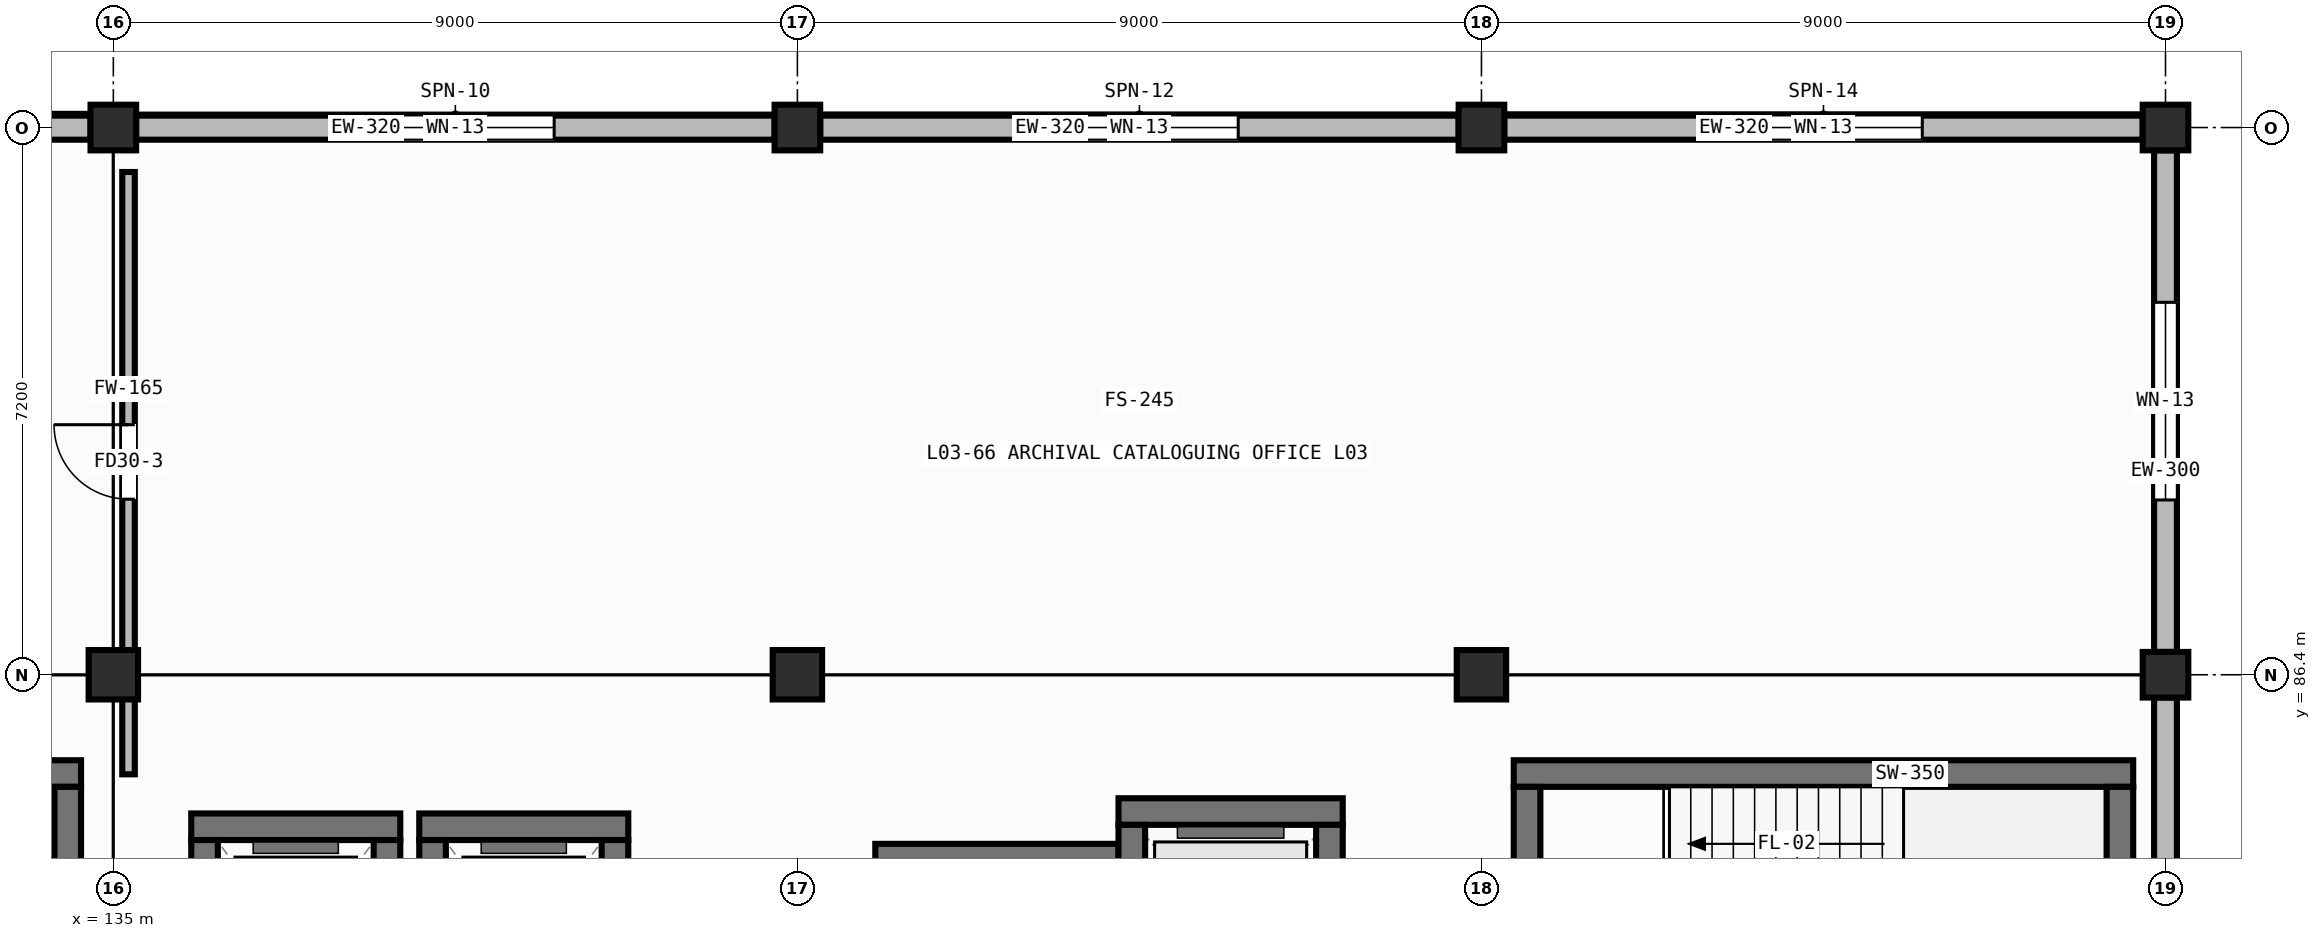
"""IFC4 building model, lengths in metres.
Left out: names, types, materials, properties, quantities, classifications, styles, units other than length and angle.
Written with IfcOpenShell. Run it as: python <this file> out.ifc"""

import sys

from ifc_helpers import new_model, si_unit, direction, frame, frame_2d, origin, origin_2d, place, context, subcontext, project, spatial, rectangle, hollow_rectangle, extrude, element, fill, save


model = new_model("IFC4")
c1 = context("Model", 3, precision=1e-05, world=origin(), true_north=direction((0.0, 1.0)))
c2 = subcontext(c1, "Body", "Model", "MODEL_VIEW")
j1 = project(units=[si_unit("LENGTHUNIT", "METRE"), si_unit("PLANEANGLEUNIT", "RADIAN")], contexts=[c1])
p1 = place(None, origin())
s1 = spatial("IfcSite", under=j1, at=p1, CompositionType="ELEMENT")
p2 = place(p1, origin())
s2 = spatial("IfcBuilding", under=s1, at=p2, CompositionType="ELEMENT")
p3 = place(p2, frame((0.0, 0.0, 8.8)))
s3 = spatial("IfcBuildingStorey", under=s2, at=p3, CompositionType="ELEMENT", Elevation=8.8)
p4 = place(p3, frame((135.0, 86.4, 0.0), z_axis=(0.0, 0.0, 1.0), x_axis=(1.0, 0.0, 0.0)))
e1 = element("IfcColumn", 1, at=p4, inside=s3, PredefinedType="COLUMN", context=c2, shape_type="SweptSolid", body=[
    extrude(hollow_rectangle(XDim=0.65, YDim=0.65, WallThickness=0.025, at=origin_2d()), origin(), (0.0, 0.0, 1.0), 4.0),
])
p5 = place(p3, frame((135.0, 93.6, 0.0), z_axis=(0.0, 0.0, 1.0), x_axis=(1.0, 0.0, 0.0)))
e2 = element("IfcColumn", 2, at=p5, inside=s3, PredefinedType="COLUMN", context=c2, shape_type="SweptSolid", body=[
    extrude(hollow_rectangle(XDim=0.6, YDim=0.6, WallThickness=0.025, at=origin_2d()), origin(), (0.0, 0.0, 1.0), 4.0),
])
p6 = place(p3, frame((144.0, 86.4, 0.0), z_axis=(0.0, 0.0, 1.0), x_axis=(1.0, 0.0, 0.0)))
e3 = element("IfcColumn", 3, at=p6, inside=s3, PredefinedType="COLUMN", context=c2, shape_type="SweptSolid", body=[
    extrude(hollow_rectangle(XDim=0.65, YDim=0.65, WallThickness=0.025, at=origin_2d()), origin(), (0.0, 0.0, 1.0), 4.0),
])
p7 = place(p3, frame((144.0, 93.6, 0.0), z_axis=(0.0, 0.0, 1.0), x_axis=(1.0, 0.0, 0.0)))
e4 = element("IfcColumn", 4, at=p7, inside=s3, PredefinedType="COLUMN", context=c2, shape_type="SweptSolid", body=[
    extrude(hollow_rectangle(XDim=0.6, YDim=0.6, WallThickness=0.025, at=origin_2d()), origin(), (0.0, 0.0, 1.0), 4.0),
])
p8 = place(p3, frame((153.0, 86.4, 0.0), z_axis=(0.0, 0.0, 1.0), x_axis=(1.0, 0.0, 0.0)))
e5 = element("IfcColumn", 5, at=p8, inside=s3, PredefinedType="COLUMN", context=c2, shape_type="SweptSolid", body=[
    extrude(hollow_rectangle(XDim=0.65, YDim=0.65, WallThickness=0.025, at=origin_2d()), origin(), (0.0, 0.0, 1.0), 4.0),
])
for number, where, z_axis, x_axis in (
    (6, (153.0, 93.6, 0.0), (0.0, 0.0, 1.0), (1.0, 0.0, 0.0)),
    (7, (162.0, 86.4, 0.0), (0.0, 0.0, 1.0), (1.0, 0.0, 0.0)),
    (8, (162.0, 93.6, 0.0), (0.0, 0.0, 1.0), (1.0, 0.0, 0.0)),
):
    element("IfcColumn", number, at=place(p3, frame(where, z_axis=z_axis, x_axis=x_axis)), inside=s3, PredefinedType="COLUMN", context=c2, shape_type="SweptSolid", body=[
        extrude(hollow_rectangle(XDim=0.6, YDim=0.6, WallThickness=0.025, at=origin_2d()), origin(), (0.0, 0.0, 1.0), 4.0),
    ])
p9 = place(p3, frame((134.7, 93.6, 0.0), z_axis=(0.0, 0.0, 1.0), x_axis=(-1.0, 0.0, 0.0)))
e9 = element("IfcWall", 9, at=p9, inside=s3, PredefinedType="STANDARD", context=c2, shape_type="SweptSolid", body=[
    extrude(rectangle(XDim=8.4, YDim=0.32, at=frame_2d((4.2, 0.0))), origin(), (0.0, 0.0, 1.0), 3.295),
])
p10 = place(p3, frame((143.7, 93.6, 0.0), z_axis=(0.0, 0.0, 1.0), x_axis=(-1.0, 0.0, 0.0)))
e10 = element("IfcWall", 10, at=p10, inside=s3, PredefinedType="STANDARD", context=c2, shape_type="SweptSolid", body=[
    extrude(rectangle(XDim=8.4, YDim=0.32, at=frame_2d((4.2, 0.0))), origin(), (0.0, 0.0, 1.0), 3.295),
])
p11 = place(p10, frame((2.9, 0.0, 0.85)))
e11 = element("IfcOpeningElement", 11, at=p11, cuts=e10, PredefinedType="OPENING", context=c2, shape_type="SweptSolid", body=[
    extrude(rectangle(XDim=2.6, YDim=1.6, at=frame_2d((1.3, 0.8))), frame((0.0, 0.172, 0.0), z_axis=(0.0, -1.0, 0.0), x_axis=(1.0, 0.0, 0.0)), (0.0, 0.0, 1.0), 0.344),
])
p12 = place(p3, frame((152.7, 93.6, 0.0), z_axis=(0.0, 0.0, 1.0), x_axis=(-1.0, 0.0, 0.0)))
e12 = element("IfcWall", 12, at=p12, inside=s3, PredefinedType="STANDARD", context=c2, shape_type="SweptSolid", body=[
    extrude(rectangle(XDim=8.4, YDim=0.32, at=frame_2d((4.2, 0.0))), origin(), (0.0, 0.0, 1.0), 3.295),
])
p13 = place(p12, frame((2.9, 0.0, 0.85)))
e13 = element("IfcOpeningElement", 13, at=p13, cuts=e12, PredefinedType="OPENING", context=c2, shape_type="SweptSolid", body=[
    extrude(rectangle(XDim=2.6, YDim=1.6, at=frame_2d((1.3, 0.8))), frame((0.0, 0.172, 0.0), z_axis=(0.0, -1.0, 0.0), x_axis=(1.0, 0.0, 0.0)), (0.0, 0.0, 1.0), 0.344),
])
p14 = place(p3, frame((161.7, 93.6, 0.0), z_axis=(0.0, 0.0, 1.0), x_axis=(-1.0, 0.0, 0.0)))
e14 = element("IfcWall", 14, at=p14, inside=s3, PredefinedType="STANDARD", context=c2, shape_type="SweptSolid", body=[
    extrude(rectangle(XDim=8.4, YDim=0.32, at=frame_2d((4.2, 0.0))), origin(), (0.0, 0.0, 1.0), 3.295),
])
p15 = place(p14, frame((2.9, 0.0, 0.85)))
e15 = element("IfcOpeningElement", 15, at=p15, cuts=e14, PredefinedType="OPENING", context=c2, shape_type="SweptSolid", body=[
    extrude(rectangle(XDim=2.6, YDim=1.6, at=frame_2d((1.3, 0.8))), frame((0.0, 0.172, 0.0), z_axis=(0.0, -1.0, 0.0), x_axis=(1.0, 0.0, 0.0)), (0.0, 0.0, 1.0), 0.344),
])
p16 = place(p3, frame((162.0, 86.1, 0.0), z_axis=(0.0, 0.0, 1.0), x_axis=(0.0, -1.0, 0.0)))
e16 = element("IfcWall", 16, at=p16, inside=s3, PredefinedType="STANDARD", context=c2, shape_type="SweptSolid", body=[
    extrude(rectangle(XDim=6.6, YDim=0.3, at=frame_2d((3.3, 0.0))), origin(), (0.0, 0.0, 1.0), 3.295),
])
p17 = place(p3, frame((162.0, 93.3, 0.0), z_axis=(0.0, 0.0, 1.0), x_axis=(0.0, -1.0, 0.0)))
e17 = element("IfcWall", 17, at=p17, inside=s3, PredefinedType="STANDARD", context=c2, shape_type="SweptSolid", body=[
    extrude(rectangle(XDim=6.6, YDim=0.3, at=frame_2d((3.3, 0.0))), origin(), (0.0, 0.0, 1.0), 3.295),
])
p18 = place(p17, frame((2.0, 0.0, 0.85)))
e18 = element("IfcOpeningElement", 18, at=p18, cuts=e17, PredefinedType="OPENING", context=c2, shape_type="SweptSolid", body=[
    extrude(rectangle(XDim=2.6, YDim=1.6, at=frame_2d((1.3, 0.8))), frame((0.0, 0.162, 0.0), z_axis=(0.0, -1.0, 0.0), x_axis=(1.0, 0.0, 0.0)), (0.0, 0.0, 1.0), 0.324),
])
p19 = place(p3, frame((126.425, 85.1, 0.0), z_axis=(0.0, 0.0, 1.0), x_axis=(1.0, 0.0, 0.0)))
e19 = element("IfcWall", 19, at=p19, inside=s3, PredefinedType="SHEAR", context=c2, shape_type="SweptSolid", body=[
    extrude(rectangle(XDim=8.15, YDim=0.35, at=frame_2d((4.075, 0.0))), origin(), (0.0, 0.0, 1.0), 3.745),
])
p20 = place(p3, frame((134.4, 81.375, 0.0), z_axis=(0.0, 0.0, 1.0), x_axis=(0.0, 1.0, 0.0)))
e20 = element("IfcWall", 20, at=p20, inside=s3, PredefinedType="SHEAR", context=c2, shape_type="SweptSolid", body=[
    extrude(rectangle(XDim=3.55, YDim=0.35, at=frame_2d((1.775, 0.0))), origin(), (0.0, 0.0, 1.0), 3.745),
])
p21 = place(p3, frame((153.425, 85.1, 0.0), z_axis=(0.0, 0.0, 1.0), x_axis=(1.0, 0.0, 0.0)))
e21 = element("IfcWall", 21, at=p21, inside=s3, PredefinedType="SHEAR", context=c2, shape_type="SweptSolid", body=[
    extrude(rectangle(XDim=8.15, YDim=0.35, at=frame_2d((4.075, 0.0))), origin(), (0.0, 0.0, 1.0), 3.745),
])
for number, where, z_axis, x_axis in (
    (22, (153.6, 81.375, 0.0), (0.0, 0.0, 1.0), (0.0, 1.0, 0.0)),
    (23, (161.4, 81.375, 0.0), (0.0, 0.0, 1.0), (0.0, 1.0, 0.0)),
):
    element("IfcWall", number, at=place(p3, frame(where, z_axis=z_axis, x_axis=x_axis)), inside=s3, PredefinedType="SHEAR", context=c2, shape_type="SweptSolid", body=[
        extrude(rectangle(XDim=3.55, YDim=0.35, at=frame_2d((1.775, 0.0))), origin(), (0.0, 0.0, 1.0), 3.745),
    ])
p22 = place(p3, frame((136.025, 84.4, 0.0), z_axis=(0.0, 0.0, 1.0), x_axis=(1.0, 0.0, 0.0)))
e24 = element("IfcWall", 24, at=p22, inside=s3, PredefinedType="SHEAR", context=c2, shape_type="SweptSolid", body=[
    extrude(rectangle(XDim=2.75, YDim=0.35, at=frame_2d((1.375, 0.0))), origin(), (0.0, 0.0, 1.0), 3.745),
])
for number, where, z_axis, x_axis in (
    (25, (136.2, 81.375, 0.0), (0.0, 0.0, 1.0), (0.0, 1.0, 0.0)),
    (26, (138.6, 81.375, 0.0), (0.0, 0.0, 1.0), (0.0, 1.0, 0.0)),
):
    element("IfcWall", number, at=place(p3, frame(where, z_axis=z_axis, x_axis=x_axis)), inside=s3, PredefinedType="SHEAR", context=c2, shape_type="SweptSolid", body=[
        extrude(rectangle(XDim=2.85, YDim=0.35, at=frame_2d((1.425, 0.0))), origin(), (0.0, 0.0, 1.0), 3.745),
    ])
p23 = place(p3, frame((139.025, 84.4, 0.0), z_axis=(0.0, 0.0, 1.0), x_axis=(1.0, 0.0, 0.0)))
e27 = element("IfcWall", 27, at=p23, inside=s3, PredefinedType="SHEAR", context=c2, shape_type="SweptSolid", body=[
    extrude(rectangle(XDim=2.75, YDim=0.35, at=frame_2d((1.375, 0.0))), origin(), (0.0, 0.0, 1.0), 3.745),
])
for number, where, z_axis, x_axis in (
    (28, (139.2, 81.375, 0.0), (0.0, 0.0, 1.0), (0.0, 1.0, 0.0)),
    (29, (141.6, 81.375, 0.0), (0.0, 0.0, 1.0), (0.0, 1.0, 0.0)),
):
    element("IfcWall", number, at=place(p3, frame(where, z_axis=z_axis, x_axis=x_axis)), inside=s3, PredefinedType="SHEAR", context=c2, shape_type="SweptSolid", body=[
        extrude(rectangle(XDim=2.85, YDim=0.35, at=frame_2d((1.425, 0.0))), origin(), (0.0, 0.0, 1.0), 3.745),
    ])
p24 = place(p3, frame((145.025, 84.0, 0.0), z_axis=(0.0, 0.0, 1.0), x_axis=(1.0, 0.0, 0.0)))
e30 = element("IfcWall", 30, at=p24, inside=s3, PredefinedType="SHEAR", context=c2, shape_type="SweptSolid", body=[
    extrude(rectangle(XDim=3.2, YDim=0.35, at=frame_2d((1.6, 0.0))), origin(), (0.0, 0.0, 1.0), 3.745),
])
p25 = place(p3, frame((148.225, 84.6, 0.0), z_axis=(0.0, 0.0, 1.0), x_axis=(1.0, 0.0, 0.0)))
e31 = element("IfcWall", 31, at=p25, inside=s3, PredefinedType="SHEAR", context=c2, shape_type="SweptSolid", body=[
    extrude(rectangle(XDim=2.95, YDim=0.35, at=frame_2d((1.475, 0.0))), origin(), (0.0, 0.0, 1.0), 3.745),
])
for number, where, z_axis, x_axis in (
    (32, (148.4, 81.375, 0.0), (0.0, 0.0, 1.0), (0.0, 1.0, 0.0)),
    (33, (151.0, 81.375, 0.0), (0.0, 0.0, 1.0), (0.0, 1.0, 0.0)),
):
    element("IfcWall", number, at=place(p3, frame(where, z_axis=z_axis, x_axis=x_axis)), inside=s3, PredefinedType="SHEAR", context=c2, shape_type="SweptSolid", body=[
        extrude(rectangle(XDim=3.05, YDim=0.35, at=frame_2d((1.525, 0.0))), origin(), (0.0, 0.0, 1.0), 3.745),
    ])
p26 = place(p3, frame((135.2, 85.09, 0.0), z_axis=(0.0, 0.0, 1.0), x_axis=(0.0, 1.0, 0.0)))
e34 = element("IfcWall", 34, at=p26, inside=s3, PredefinedType="PARTITIONING", context=c2, shape_type="SweptSolid", body=[
    extrude(rectangle(XDim=7.925, YDim=0.165, at=frame_2d((3.962, 0.0))), origin(), (0.0, 0.0, 1.0), 3.025),
])
p27 = place(p26, frame((3.62, 0.0, 0.0)))
e35 = element("IfcOpeningElement", 35, at=p27, cuts=e34, PredefinedType="OPENING", context=c2, shape_type="SweptSolid", body=[
    extrude(rectangle(XDim=0.98, YDim=2.02, at=frame_2d((0.49, 1.01))), frame((0.0, 0.094, 0.0), z_axis=(0.0, -1.0, 0.0), x_axis=(1.0, 0.0, 0.0)), (0.0, 0.0, 1.0), 0.189),
])
p28 = place(p11, origin())
e36 = element("IfcWindow", 36, at=p28, inside=s3, PartitioningType="DOUBLE_PANEL_VERTICAL", PredefinedType="WINDOW", context=c2, shape_type="SweptSolid", body=[
    extrude(rectangle(XDim=2.6, YDim=1.6, at=frame_2d((1.3, 0.8))), frame((0.0, 0.03, 0.0), z_axis=(0.0, -1.0, 0.0), x_axis=(1.0, 0.0, 0.0)), (0.0, 0.0, 1.0), 0.06),
])
fill(e11, e36)
p29 = place(p13, origin())
e37 = element("IfcWindow", 37, at=p29, inside=s3, PartitioningType="DOUBLE_PANEL_VERTICAL", PredefinedType="WINDOW", context=c2, shape_type="SweptSolid", body=[
    extrude(rectangle(XDim=2.6, YDim=1.6, at=frame_2d((1.3, 0.8))), frame((0.0, 0.03, 0.0), z_axis=(0.0, -1.0, 0.0), x_axis=(1.0, 0.0, 0.0)), (0.0, 0.0, 1.0), 0.06),
])
fill(e13, e37)
p30 = place(p15, origin())
e38 = element("IfcWindow", 38, at=p30, inside=s3, PartitioningType="DOUBLE_PANEL_VERTICAL", PredefinedType="WINDOW", context=c2, shape_type="SweptSolid", body=[
    extrude(rectangle(XDim=2.6, YDim=1.6, at=frame_2d((1.3, 0.8))), frame((0.0, 0.03, 0.0), z_axis=(0.0, -1.0, 0.0), x_axis=(1.0, 0.0, 0.0)), (0.0, 0.0, 1.0), 0.06),
])
fill(e15, e38)
p31 = place(p18, origin())
e39 = element("IfcWindow", 39, at=p31, inside=s3, PartitioningType="DOUBLE_PANEL_VERTICAL", PredefinedType="WINDOW", context=c2, shape_type="SweptSolid", body=[
    extrude(rectangle(XDim=2.6, YDim=1.6, at=frame_2d((1.3, 0.8))), frame((0.0, 0.03, 0.0), z_axis=(0.0, -1.0, 0.0), x_axis=(1.0, 0.0, 0.0)), (0.0, 0.0, 1.0), 0.06),
])
fill(e18, e39)
p32 = place(p27, origin())
e40 = element("IfcDoor", 40, at=p32, inside=s3, OperationType="SINGLE_SWING_RIGHT", PredefinedType="DOOR", context=c2, shape_type="SweptSolid", body=[
    extrude(rectangle(XDim=0.98, YDim=2.02, at=frame_2d((0.49, 1.01))), frame((0.0, 0.025, 0.0), z_axis=(0.0, -1.0, 0.0), x_axis=(1.0, 0.0, 0.0)), (0.0, 0.0, 1.0), 0.05),
])
fill(e35, e40)
save(model, sys.argv[1])
